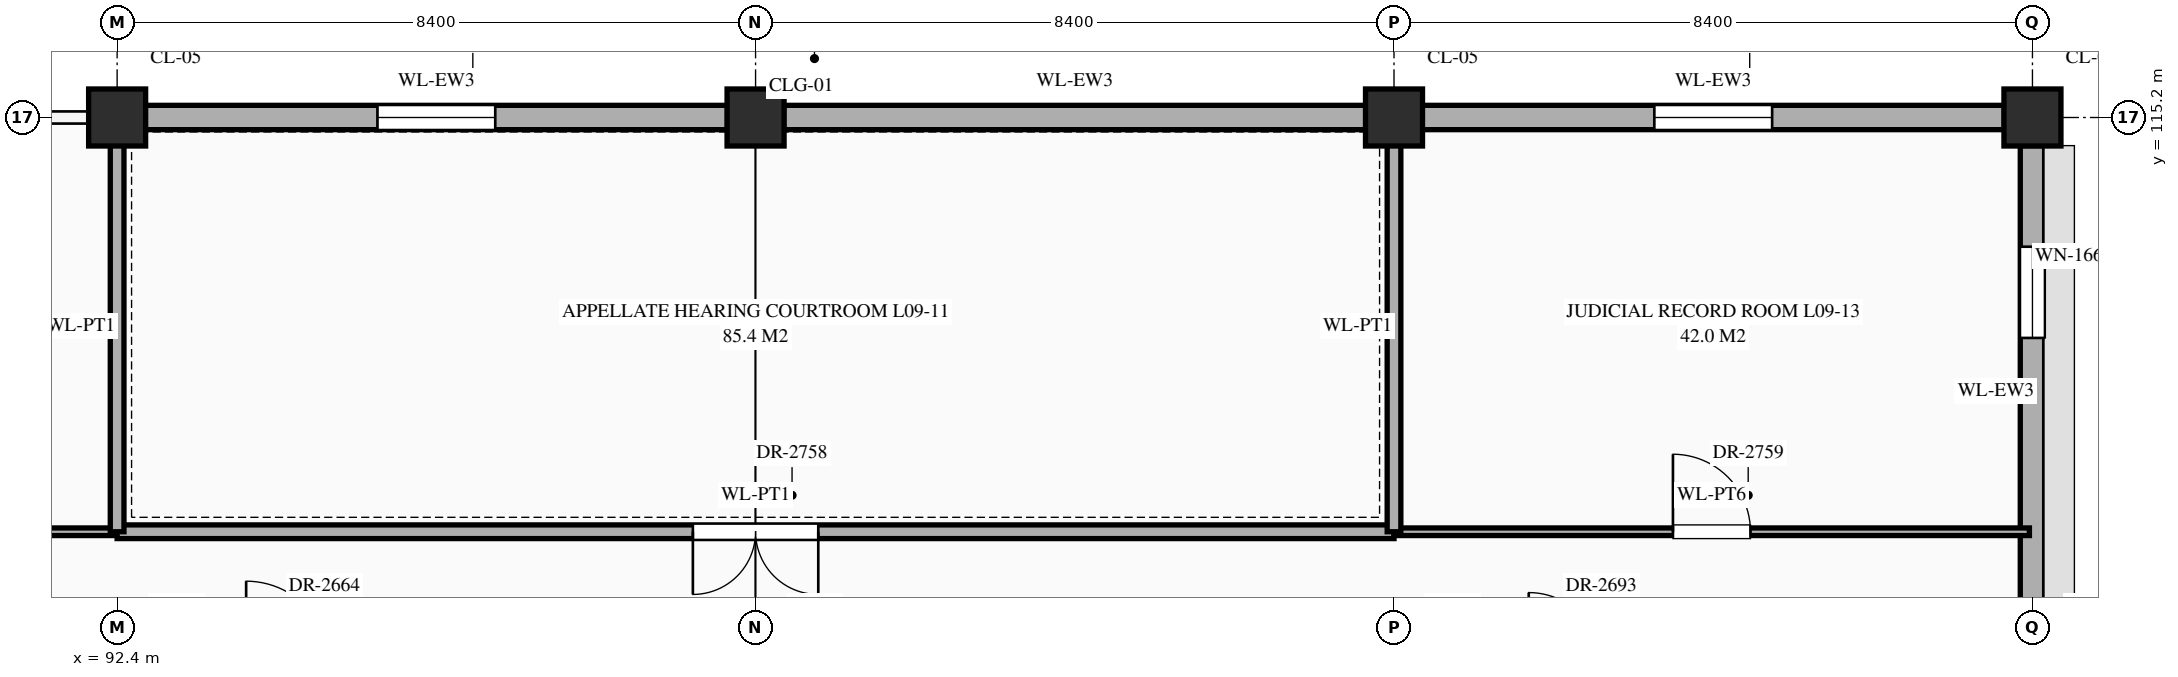
"""IFC4 building model, lengths in metres.
Left out: names, types, materials, properties, quantities, classifications, styles, units other than length and angle.
Written with IfcOpenShell. Run it as: python <this file> out.ifc"""

import sys

from ifc_helpers import new_model, si_unit, direction, frame, frame_2d, origin, origin_2d, place, context, subcontext, project, spatial, rectangle, extrude, element, fill, save


model = new_model("IFC4")
c1 = context("Model", 3, precision=1e-05, world=origin(), true_north=direction((0.0, 1.0)))
c2 = subcontext(c1, "Body", "Model", "MODEL_VIEW")
j1 = project(units=[si_unit("LENGTHUNIT", "METRE"), si_unit("PLANEANGLEUNIT", "RADIAN")], contexts=[c1])
p1 = place(None, origin())
s1 = spatial("IfcSite", under=j1, at=p1, CompositionType="ELEMENT")
p2 = place(p1, origin())
s2 = spatial("IfcBuilding", under=s1, at=p2, CompositionType="ELEMENT")
p3 = place(p2, frame((0.0, 0.0, 39.3)))
s3 = spatial("IfcBuildingStorey", under=s2, at=p3, CompositionType="ELEMENT", Elevation=39.3)
for number, where, z_axis, x_axis in (
    (1, (92.4, 115.2, 0.0), (0.0, 0.0, 1.0), (1.0, 0.0, 0.0)),
    (2, (100.8, 115.2, 0.0), (0.0, 0.0, 1.0), (1.0, 0.0, 0.0)),
    (3, (109.2, 115.2, 0.0), (0.0, 0.0, 1.0), (1.0, 0.0, 0.0)),
    (4, (117.6, 115.2, 0.0), (0.0, 0.0, 1.0), (1.0, 0.0, 0.0)),
):
    element("IfcColumn", number, at=place(p3, frame(where, z_axis=z_axis, x_axis=x_axis)), inside=s3, PredefinedType="COLUMN", context=c2, shape_type="SweptSolid", body=[
        extrude(rectangle(XDim=0.75, YDim=0.75, at=origin_2d()), origin(), (0.0, 0.0, 1.0), 4.2),
    ])
p4 = place(p3, frame((92.77, 115.2, 0.0), z_axis=(0.0, 0.0, 1.0), x_axis=(1.0, 0.0, 0.0)))
e5 = element("IfcWall", 5, at=p4, inside=s3, PredefinedType="STANDARD", context=c2, shape_type="SweptSolid", body=[
    extrude(rectangle(XDim=7.66, YDim=0.32, at=frame_2d((3.83, 0.0))), origin(), (0.0, 0.0, 1.0), 3.3),
])
p5 = place(p4, frame((3.055, 0.0, 0.85)))
e6 = element("IfcOpeningElement", 6, at=p5, cuts=e5, PredefinedType="OPENING", context=c2, shape_type="SweptSolid", body=[
    extrude(rectangle(XDim=1.55, YDim=1.74, at=frame_2d((0.775, 0.87))), frame((0.0, 0.172, 0.0), z_axis=(0.0, -1.0, 0.0), x_axis=(1.0, 0.0, 0.0)), (0.0, 0.0, 1.0), 0.344),
])
p6 = place(p3, frame((101.17, 115.2, 0.0), z_axis=(0.0, 0.0, 1.0), x_axis=(1.0, 0.0, 0.0)))
e7 = element("IfcWall", 7, at=p6, inside=s3, PredefinedType="STANDARD", context=c2, shape_type="SweptSolid", body=[
    extrude(rectangle(XDim=7.66, YDim=0.32, at=frame_2d((3.83, 0.0))), origin(), (0.0, 0.0, 1.0), 3.3),
])
p7 = place(p3, frame((109.57, 115.2, 0.0), z_axis=(0.0, 0.0, 1.0), x_axis=(1.0, 0.0, 0.0)))
e8 = element("IfcWall", 8, at=p7, inside=s3, PredefinedType="STANDARD", context=c2, shape_type="SweptSolid", body=[
    extrude(rectangle(XDim=7.66, YDim=0.32, at=frame_2d((3.83, 0.0))), origin(), (0.0, 0.0, 1.0), 3.3),
])
p8 = place(p7, frame((3.055, 0.0, 0.85)))
e9 = element("IfcOpeningElement", 9, at=p8, cuts=e8, PredefinedType="OPENING", context=c2, shape_type="SweptSolid", body=[
    extrude(rectangle(XDim=1.55, YDim=2.12, at=frame_2d((0.775, 1.06))), frame((0.0, 0.172, 0.0), z_axis=(0.0, -1.0, 0.0), x_axis=(1.0, 0.0, 0.0)), (0.0, 0.0, 1.0), 0.344),
])
p9 = place(p3, frame((117.6, 108.37, 0.0), z_axis=(0.0, 0.0, 1.0), x_axis=(0.0, 1.0, 0.0)))
e10 = element("IfcWall", 10, at=p9, inside=s3, PredefinedType="STANDARD", context=c2, shape_type="SweptSolid", body=[
    extrude(rectangle(XDim=6.46, YDim=0.32, at=frame_2d((3.23, 0.0))), origin(), (0.0, 0.0, 1.0), 3.3),
])
p10 = place(p9, frame((3.93, 0.0, 0.85)))
e11 = element("IfcOpeningElement", 11, at=p10, cuts=e10, PredefinedType="OPENING", context=c2, shape_type="SweptSolid", body=[
    extrude(rectangle(XDim=1.2, YDim=1.56, at=frame_2d((0.6, 0.78))), frame((0.0, 0.172, 0.0), z_axis=(0.0, -1.0, 0.0), x_axis=(1.0, 0.0, 0.0)), (0.0, 0.0, 1.0), 0.344),
])
p11 = place(p3, frame((75.6, 109.75, 0.0), z_axis=(0.0, 0.0, 1.0), x_axis=(1.0, 0.0, 0.0)))
e12 = element("IfcWall", 12, at=p11, inside=s3, PredefinedType="STANDARD", context=c2, shape_type="SweptSolid", body=[
    extrude(rectangle(XDim=16.8, YDim=0.1, at=frame_2d((8.4, 0.0))), origin(), (0.0, 0.0, 1.0), 3.95),
])
p12 = place(p11, frame((3.56, 0.0, 0.0)))
e13 = element("IfcOpeningElement", 13, at=p12, cuts=e12, PredefinedType="OPENING", context=c2, shape_type="SweptSolid", body=[
    extrude(rectangle(XDim=1.28, YDim=2.35, at=frame_2d((0.64, 1.175))), frame((0.0, 0.062, 0.0), z_axis=(0.0, -1.0, 0.0), x_axis=(1.0, 0.0, 0.0)), (0.0, 0.0, 1.0), 0.124),
])
p13 = place(p11, frame((12.13, 0.0, 0.0)))
e14 = element("IfcOpeningElement", 14, at=p13, cuts=e12, PredefinedType="OPENING", context=c2, shape_type="SweptSolid", body=[
    extrude(rectangle(XDim=0.94, YDim=2.3, at=frame_2d((0.47, 1.15))), frame((0.0, 0.062, 0.0), z_axis=(0.0, -1.0, 0.0), x_axis=(1.0, 0.0, 0.0)), (0.0, 0.0, 1.0), 0.124),
])
p14 = place(p3, frame((92.4, 109.75, 0.0), z_axis=(0.0, 0.0, 1.0), x_axis=(1.0, 0.0, 0.0)))
e15 = element("IfcWall", 15, at=p14, inside=s3, PredefinedType="STANDARD", context=c2, shape_type="SweptSolid", body=[
    extrude(rectangle(XDim=16.8, YDim=0.18, at=frame_2d((8.4, 0.0))), origin(), (0.0, 0.0, 1.0), 3.95),
])
p15 = place(p14, frame((7.575, 0.0, 0.0)))
e16 = element("IfcOpeningElement", 16, at=p15, cuts=e15, PredefinedType="OPENING", context=c2, shape_type="SweptSolid", body=[
    extrude(rectangle(XDim=1.65, YDim=2.4, at=frame_2d((0.825, 1.2))), frame((0.0, 0.102, 0.0), z_axis=(0.0, -1.0, 0.0), x_axis=(1.0, 0.0, 0.0)), (0.0, 0.0, 1.0), 0.204),
])
p16 = place(p3, frame((109.2, 109.75, 0.0), z_axis=(0.0, 0.0, 1.0), x_axis=(1.0, 0.0, 0.0)))
e17 = element("IfcWall", 17, at=p16, inside=s3, PredefinedType="STANDARD", context=c2, shape_type="SweptSolid", body=[
    extrude(rectangle(XDim=8.36, YDim=0.1, at=frame_2d((4.18, 0.0))), origin(), (0.0, 0.0, 1.0), 3.95),
])
p17 = place(p16, frame((3.67, 0.0, 0.0)))
e18 = element("IfcOpeningElement", 18, at=p17, cuts=e17, PredefinedType="OPENING", context=c2, shape_type="SweptSolid", body=[
    extrude(rectangle(XDim=1.02, YDim=2.4, at=frame_2d((0.51, 1.2))), frame((0.0, 0.062, 0.0), z_axis=(0.0, -1.0, 0.0), x_axis=(1.0, 0.0, 0.0)), (0.0, 0.0, 1.0), 0.124),
])
for number, where, z_axis, x_axis in (
    (19, (92.4, 109.75, 0.0), (0.0, 0.0, 1.0), (0.0, 1.0, 0.0)),
    (20, (109.2, 109.75, 0.0), (0.0, 0.0, 1.0), (0.0, 1.0, 0.0)),
):
    element("IfcWall", number, at=place(p3, frame(where, z_axis=z_axis, x_axis=x_axis)), inside=s3, PredefinedType="STANDARD", context=c2, shape_type="SweptSolid", body=[
        extrude(rectangle(XDim=5.41, YDim=0.18, at=frame_2d((2.705, 0.0))), origin(), (0.0, 0.0, 1.0), 3.2),
    ])
p18 = place(p5, origin())
e21 = element("IfcWindow", 21, at=p18, inside=s3, PartitioningType="SINGLE_PANEL", PredefinedType="WINDOW", context=c2, shape_type="SweptSolid", body=[
    extrude(rectangle(XDim=1.55, YDim=1.74, at=frame_2d((0.775, 0.87))), frame((0.0, 0.03, 0.0), z_axis=(0.0, -1.0, 0.0), x_axis=(1.0, 0.0, 0.0)), (0.0, 0.0, 1.0), 0.06),
])
fill(e6, e21)
p19 = place(p8, origin())
e22 = element("IfcWindow", 22, at=p19, inside=s3, PartitioningType="SINGLE_PANEL", PredefinedType="WINDOW", context=c2, shape_type="SweptSolid", body=[
    extrude(rectangle(XDim=1.55, YDim=2.12, at=frame_2d((0.775, 1.06))), frame((0.0, 0.03, 0.0), z_axis=(0.0, -1.0, 0.0), x_axis=(1.0, 0.0, 0.0)), (0.0, 0.0, 1.0), 0.06),
])
fill(e9, e22)
p20 = place(p10, origin())
e23 = element("IfcWindow", 23, at=p20, inside=s3, PartitioningType="SINGLE_PANEL", PredefinedType="WINDOW", context=c2, shape_type="SweptSolid", body=[
    extrude(rectangle(XDim=1.2, YDim=1.56, at=frame_2d((0.6, 0.78))), frame((0.0, 0.03, 0.0), z_axis=(0.0, -1.0, 0.0), x_axis=(1.0, 0.0, 0.0)), (0.0, 0.0, 1.0), 0.06),
])
fill(e11, e23)
p21 = place(p15, frame((1.65, 0.0, 0.0), z_axis=(0.0, 0.0, 1.0), x_axis=(-1.0, 0.0, 0.0)))
e24 = element("IfcDoor", 24, at=p21, inside=s3, OperationType="DOUBLE_DOOR_SINGLE_SWING", PredefinedType="DOOR", context=c2, shape_type="SweptSolid", body=[
    extrude(rectangle(XDim=1.65, YDim=2.4, at=frame_2d((0.825, 1.2))), frame((0.0, 0.025, 0.0), z_axis=(0.0, -1.0, 0.0), x_axis=(1.0, 0.0, 0.0)), (0.0, 0.0, 1.0), 0.05),
])
fill(e16, e24)
p22 = place(p17, origin())
e25 = element("IfcDoor", 25, at=p22, inside=s3, OperationType="SINGLE_SWING_LEFT", PredefinedType="DOOR", context=c2, shape_type="SweptSolid", body=[
    extrude(rectangle(XDim=1.02, YDim=2.4, at=frame_2d((0.51, 1.2))), frame((0.0, 0.025, 0.0), z_axis=(0.0, -1.0, 0.0), x_axis=(1.0, 0.0, 0.0)), (0.0, 0.0, 1.0), 0.05),
])
fill(e18, e25)
save(model, sys.argv[1])
